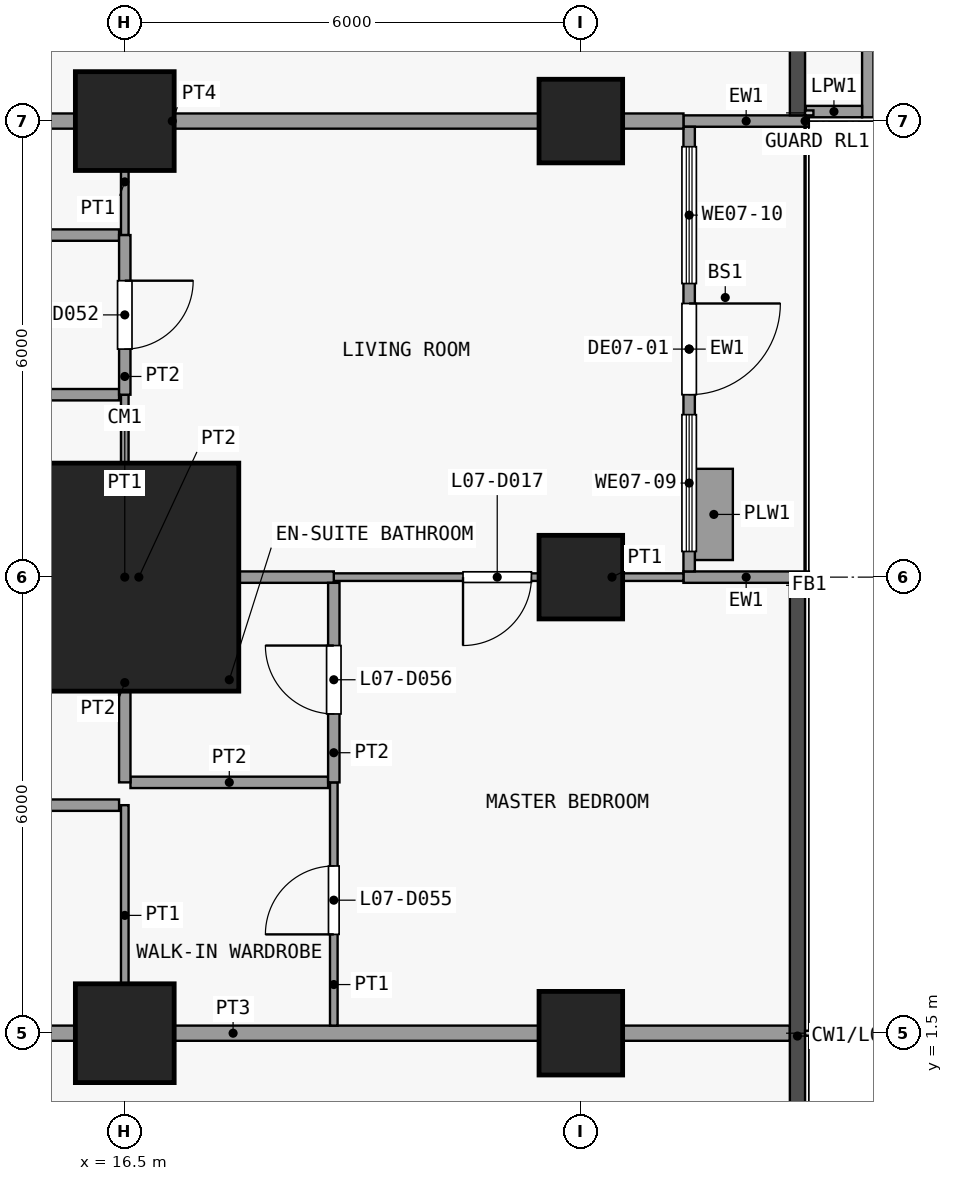
"""IFC4 building model, lengths in metres.
Left out: names, types, materials, properties, quantities, classifications, styles, units other than length and angle.
Written with IfcOpenShell. Run it as: python <this file> out.ifc"""

import sys

from ifc_helpers import new_model, si_unit, direction, frame, frame_2d, origin, origin_2d, place, context, subcontext, project, spatial, rectangle, extrude, element, fill, save


model = new_model("IFC4")
c1 = context("Model", 3, precision=1e-05, world=origin(), true_north=direction((0.0, 1.0)))
c2 = subcontext(c1, "Body", "Model", "MODEL_VIEW")
j1 = project(units=[si_unit("LENGTHUNIT", "METRE"), si_unit("PLANEANGLEUNIT", "RADIAN")], contexts=[c1])
p1 = place(None, origin())
s1 = spatial("IfcSite", under=j1, at=p1, CompositionType="ELEMENT")
p2 = place(p1, origin())
s2 = spatial("IfcBuilding", under=s1, at=p2, CompositionType="ELEMENT")
p3 = place(p2, frame((0.0, 0.0, 36.1)))
s3 = spatial("IfcBuildingStorey", under=s2, at=p3, CompositionType="ELEMENT", Elevation=36.1)
p4 = place(p3, frame((16.5, 1.5, 0.0), z_axis=(0.0, 0.0, 1.0), x_axis=(1.0, 0.0, 0.0)))
e1 = element("IfcColumn", 1, at=p4, inside=s3, PredefinedType="COLUMN", context=c2, shape_type="SweptSolid", body=[
    extrude(rectangle(XDim=1.3, YDim=1.3, at=origin_2d()), origin(), (0.0, 0.0, 1.0), 3.6),
])
p5 = place(p3, frame((16.5, 7.5, 0.0), z_axis=(0.0, 0.0, 1.0), x_axis=(1.0, 0.0, 0.0)))
e2 = element("IfcColumn", 2, at=p5, inside=s3, PredefinedType="COLUMN", context=c2, shape_type="SweptSolid", body=[
    extrude(rectangle(XDim=3.0, YDim=3.0, at=origin_2d()), origin(), (0.0, 0.0, 1.0), 3.6),
])
p6 = place(p3, frame((16.5, 13.5, 0.0), z_axis=(0.0, 0.0, 1.0), x_axis=(1.0, 0.0, 0.0)))
e3 = element("IfcColumn", 3, at=p6, inside=s3, PredefinedType="COLUMN", context=c2, shape_type="SweptSolid", body=[
    extrude(rectangle(XDim=1.3, YDim=1.3, at=origin_2d()), origin(), (0.0, 0.0, 1.0), 3.6),
])
for number, where, z_axis, x_axis in (
    (4, (22.5, 1.5, 0.0), (0.0, 0.0, 1.0), (1.0, 0.0, 0.0)),
    (5, (22.5, 7.5, 0.0), (0.0, 0.0, 1.0), (1.0, 0.0, 0.0)),
    (6, (22.5, 13.5, 0.0), (0.0, 0.0, 1.0), (1.0, 0.0, 0.0)),
):
    element("IfcColumn", number, at=place(p3, frame(where, z_axis=z_axis, x_axis=x_axis)), inside=s3, PredefinedType="COLUMN", context=c2, shape_type="SweptSolid", body=[
        extrude(rectangle(XDim=1.1, YDim=1.1, at=origin_2d()), origin(), (0.0, 0.0, 1.0), 3.6),
    ])
for number, where, z_axis, x_axis in (
    (7, (23.85, 7.5, 0.0), (0.0, 0.0, 1.0), (1.0, 0.0, 0.0)),
    (8, (23.85, 13.5, 0.0), (0.0, 0.0, 1.0), (1.0, 0.0, 0.0)),
):
    element("IfcWall", number, at=place(p3, frame(where, z_axis=z_axis, x_axis=x_axis)), inside=s3, PredefinedType="SOLIDWALL", context=c2, shape_type="SweptSolid", body=[
        extrude(rectangle(XDim=1.65, YDim=0.15, at=frame_2d((0.825, 0.0))), origin(), (0.0, 0.0, 1.0), 3.3),
    ])
p7 = place(p3, frame((23.925, 13.425, 0.0), z_axis=(0.0, 0.0, 1.0), x_axis=(0.0, -1.0, 0.0)))
e9 = element("IfcWall", 9, at=p7, inside=s3, PredefinedType="SOLIDWALL", context=c2, shape_type="SweptSolid", body=[
    extrude(rectangle(XDim=5.85, YDim=0.15, at=frame_2d((2.925, 0.0))), origin(), (0.0, 0.0, 1.0), 3.3),
])
p8 = place(p7, frame((2.325, 0.0, 0.0)))
e10 = element("IfcOpeningElement", 10, at=p8, cuts=e9, PredefinedType="OPENING", context=c2, shape_type="SweptSolid", body=[
    extrude(rectangle(XDim=1.2, YDim=2.4, at=frame_2d((0.6, 1.2))), frame((0.0, 0.085, 0.0), z_axis=(0.0, -1.0, 0.0), x_axis=(1.0, 0.0, 0.0)), (0.0, 0.0, 1.0), 0.17),
])
p9 = place(p7, frame((3.788, 0.0, 0.9)))
e11 = element("IfcOpeningElement", 11, at=p9, cuts=e9, PredefinedType="OPENING", context=c2, shape_type="SweptSolid", body=[
    extrude(rectangle(XDim=1.8, YDim=2.1, at=frame_2d((0.9, 1.05))), frame((0.0, 0.085, 0.0), z_axis=(0.0, -1.0, 0.0), x_axis=(1.0, 0.0, 0.0)), (0.0, 0.0, 1.0), 0.17),
])
p10 = place(p7, frame((0.262, 0.0, 0.9)))
e12 = element("IfcOpeningElement", 12, at=p10, cuts=e9, PredefinedType="OPENING", context=c2, shape_type="SweptSolid", body=[
    extrude(rectangle(XDim=1.8, YDim=2.1, at=frame_2d((0.9, 1.05))), frame((0.0, 0.085, 0.0), z_axis=(0.0, -1.0, 0.0), x_axis=(1.0, 0.0, 0.0)), (0.0, 0.0, 1.0), 0.17),
])
p11 = place(p3, frame((24.25, 7.725, 0.0), z_axis=(0.0, 0.0, 1.0), x_axis=(0.0, 1.0, 0.0)))
e13 = element("IfcWall", 13, at=p11, inside=s3, PredefinedType="USERDEFINED", context=c2, shape_type="SweptSolid", body=[
    extrude(rectangle(XDim=1.2, YDim=0.5, at=frame_2d((0.6, 0.0))), origin(), (0.0, 0.0, 1.0), 0.9),
])
p12 = place(p3, frame((26.275, 19.3, 0.0), z_axis=(0.0, 0.0, 1.0), x_axis=(0.0, -1.0, 0.0)))
e14 = element("IfcWall", 14, at=p12, inside=s3, PredefinedType="PARAPET", context=c2, shape_type="SweptSolid", body=[
    extrude(rectangle(XDim=5.75, YDim=0.15, at=frame_2d((2.875, 0.0))), origin(), (0.0, 0.0, 1.0), 1.15),
])
p13 = place(p3, frame((26.2, 13.625, 0.0), z_axis=(0.0, 0.0, 1.0), x_axis=(-1.0, 0.0, 0.0)))
e15 = element("IfcWall", 15, at=p13, inside=s3, PredefinedType="PARAPET", context=c2, shape_type="SweptSolid", body=[
    extrude(rectangle(XDim=0.74, YDim=0.15, at=frame_2d((0.37, 0.0))), origin(), (0.0, 0.0, 1.0), 1.15),
])
p14 = place(p3, frame((10.6, 1.5, 0.0), z_axis=(0.0, 0.0, 1.0), x_axis=(1.0, 0.0, 0.0)))
e16 = element("IfcWall", 16, at=p14, inside=s3, PredefinedType="PARTITIONING", context=c2, shape_type="SweptSolid", body=[
    extrude(rectangle(XDim=14.65, YDim=0.2, at=frame_2d((7.325, 0.0))), origin(), (0.0, 0.0, 1.0), 3.3),
])
p15 = place(p3, frame((10.6, 4.5, 0.0), z_axis=(0.0, 0.0, 1.0), x_axis=(1.0, 0.0, 0.0)))
e17 = element("IfcWall", 17, at=p15, inside=s3, PredefinedType="PARTITIONING", context=c2, shape_type="SweptSolid", body=[
    extrude(rectangle(XDim=5.825, YDim=0.15, at=frame_2d((2.913, 0.0))), origin(), (0.0, 0.0, 1.0), 3.3),
])
p16 = place(p15, frame((2.5, 0.0, 0.0)))
e18 = element("IfcOpeningElement", 18, at=p16, cuts=e17, PredefinedType="OPENING", context=c2, shape_type="SweptSolid", body=[
    extrude(rectangle(XDim=0.9, YDim=2.1, at=frame_2d((0.45, 1.05))), frame((0.0, 0.085, 0.0), z_axis=(0.0, -1.0, 0.0), x_axis=(1.0, 0.0, 0.0)), (0.0, 0.0, 1.0), 0.17),
])
p17 = place(p3, frame((16.575, 4.8, 0.0), z_axis=(0.0, 0.0, 1.0), x_axis=(1.0, 0.0, 0.0)))
e19 = element("IfcWall", 19, at=p17, inside=s3, PredefinedType="PARTITIONING", context=c2, shape_type="SweptSolid", body=[
    extrude(rectangle(XDim=2.6, YDim=0.15, at=frame_2d((1.3, 0.0))), origin(), (0.0, 0.0, 1.0), 3.3),
])
p18 = place(p3, frame((19.25, 7.5, 0.0), z_axis=(0.0, 0.0, 1.0), x_axis=(1.0, 0.0, 0.0)))
e20 = element("IfcWall", 20, at=p18, inside=s3, PredefinedType="PARTITIONING", context=c2, shape_type="SweptSolid", body=[
    extrude(rectangle(XDim=4.6, YDim=0.1, at=frame_2d((2.3, 0.0))), origin(), (0.0, 0.0, 1.0), 3.3),
])
p19 = place(p18, frame((1.7, 0.0, 0.0)))
e21 = element("IfcOpeningElement", 21, at=p19, cuts=e20, PredefinedType="OPENING", context=c2, shape_type="SweptSolid", body=[
    extrude(rectangle(XDim=0.9, YDim=2.1, at=frame_2d((0.45, 1.05))), frame((0.0, 0.06, 0.0), z_axis=(0.0, -1.0, 0.0), x_axis=(1.0, 0.0, 0.0)), (0.0, 0.0, 1.0), 0.12),
])
p20 = place(p3, frame((10.6, 7.5, 0.0), z_axis=(0.0, 0.0, 1.0), x_axis=(1.0, 0.0, 0.0)))
e22 = element("IfcWall", 22, at=p20, inside=s3, PredefinedType="PARTITIONING", context=c2, shape_type="SweptSolid", body=[
    extrude(rectangle(XDim=8.65, YDim=0.15, at=frame_2d((4.325, 0.0))), origin(), (0.0, 0.0, 1.0), 3.3),
])
p21 = place(p20, frame((2.5, 0.0, 0.0)))
e23 = element("IfcOpeningElement", 23, at=p21, cuts=e22, PredefinedType="OPENING", context=c2, shape_type="SweptSolid", body=[
    extrude(rectangle(XDim=0.9, YDim=2.1, at=frame_2d((0.45, 1.05))), frame((0.0, 0.085, 0.0), z_axis=(0.0, -1.0, 0.0), x_axis=(1.0, 0.0, 0.0)), (0.0, 0.0, 1.0), 0.17),
])
p22 = place(p3, frame((10.6, 9.9, 0.0), z_axis=(0.0, 0.0, 1.0), x_axis=(1.0, 0.0, 0.0)))
e24 = element("IfcWall", 24, at=p22, inside=s3, PredefinedType="PARTITIONING", context=c2, shape_type="SweptSolid", body=[
    extrude(rectangle(XDim=5.825, YDim=0.15, at=frame_2d((2.913, 0.0))), origin(), (0.0, 0.0, 1.0), 3.3),
])
p23 = place(p22, frame((2.5, 0.0, 0.0)))
e25 = element("IfcOpeningElement", 25, at=p23, cuts=e24, PredefinedType="OPENING", context=c2, shape_type="SweptSolid", body=[
    extrude(rectangle(XDim=0.9, YDim=2.1, at=frame_2d((0.45, 1.05))), frame((0.0, 0.085, 0.0), z_axis=(0.0, -1.0, 0.0), x_axis=(1.0, 0.0, 0.0)), (0.0, 0.0, 1.0), 0.17),
])
p24 = place(p3, frame((10.6, 12.0, 0.0), z_axis=(0.0, 0.0, 1.0), x_axis=(1.0, 0.0, 0.0)))
e26 = element("IfcWall", 26, at=p24, inside=s3, PredefinedType="PARTITIONING", context=c2, shape_type="SweptSolid", body=[
    extrude(rectangle(XDim=5.825, YDim=0.15, at=frame_2d((2.913, 0.0))), origin(), (0.0, 0.0, 1.0), 3.3),
])
p25 = place(p24, frame((2.5, 0.0, 0.0)))
e27 = element("IfcOpeningElement", 27, at=p25, cuts=e26, PredefinedType="OPENING", context=c2, shape_type="SweptSolid", body=[
    extrude(rectangle(XDim=0.9, YDim=2.1, at=frame_2d((0.45, 1.05))), frame((0.0, 0.085, 0.0), z_axis=(0.0, -1.0, 0.0), x_axis=(1.0, 0.0, 0.0)), (0.0, 0.0, 1.0), 0.17),
])
p26 = place(p3, frame((10.4, 13.5, 0.0), z_axis=(0.0, 0.0, 1.0), x_axis=(1.0, 0.0, 0.0)))
e28 = element("IfcWall", 28, at=p26, inside=s3, PredefinedType="PARTITIONING", context=c2, shape_type="SweptSolid", body=[
    extrude(rectangle(XDim=13.45, YDim=0.2, at=frame_2d((6.725, 0.0))), origin(), (0.0, 0.0, 1.0), 3.3),
])
p27 = place(p3, frame((16.5, 1.6, 0.0), z_axis=(0.0, 0.0, 1.0), x_axis=(0.0, 1.0, 0.0)))
e29 = element("IfcWall", 29, at=p27, inside=s3, PredefinedType="PARTITIONING", context=c2, shape_type="SweptSolid", body=[
    extrude(rectangle(XDim=2.9, YDim=0.1, at=frame_2d((1.45, 0.0))), origin(), (0.0, 0.0, 1.0), 3.3),
])
p28 = place(p3, frame((16.5, 7.575, 0.0), z_axis=(0.0, 0.0, 1.0), x_axis=(0.0, 1.0, 0.0)))
e30 = element("IfcWall", 30, at=p28, inside=s3, PredefinedType="PARTITIONING", context=c2, shape_type="SweptSolid", body=[
    extrude(rectangle(XDim=2.325, YDim=0.1, at=frame_2d((1.163, 0.0))), origin(), (0.0, 0.0, 1.0), 3.3),
])
p29 = place(p3, frame((16.5, 12.0, 0.0), z_axis=(0.0, 0.0, 1.0), x_axis=(0.0, 1.0, 0.0)))
e31 = element("IfcWall", 31, at=p29, inside=s3, PredefinedType="PARTITIONING", context=c2, shape_type="SweptSolid", body=[
    extrude(rectangle(XDim=1.4, YDim=0.1, at=frame_2d((0.7, 0.0))), origin(), (0.0, 0.0, 1.0), 3.3),
])
p30 = place(p3, frame((16.5, 4.8, 0.0), z_axis=(0.0, 0.0, 1.0), x_axis=(0.0, 1.0, 0.0)))
e32 = element("IfcWall", 32, at=p30, inside=s3, PredefinedType="PARTITIONING", context=c2, shape_type="SweptSolid", body=[
    extrude(rectangle(XDim=2.625, YDim=0.15, at=frame_2d((1.312, 0.0))), origin(), (0.0, 0.0, 1.0), 3.3),
])
p31 = place(p3, frame((16.5, 9.9, 0.0), z_axis=(0.0, 0.0, 1.0), x_axis=(0.0, 1.0, 0.0)))
e33 = element("IfcWall", 33, at=p31, inside=s3, PredefinedType="PARTITIONING", context=c2, shape_type="SweptSolid", body=[
    extrude(rectangle(XDim=2.1, YDim=0.15, at=frame_2d((1.05, 0.0))), origin(), (0.0, 0.0, 1.0), 3.3),
])
p32 = place(p31, frame((0.6, 0.0, 0.0)))
e34 = element("IfcOpeningElement", 34, at=p32, cuts=e33, PredefinedType="OPENING", context=c2, shape_type="SweptSolid", body=[
    extrude(rectangle(XDim=0.9, YDim=2.1, at=frame_2d((0.45, 1.05))), frame((0.0, 0.085, 0.0), z_axis=(0.0, -1.0, 0.0), x_axis=(1.0, 0.0, 0.0)), (0.0, 0.0, 1.0), 0.17),
])
p33 = place(p3, frame((19.25, 1.6, 0.0), z_axis=(0.0, 0.0, 1.0), x_axis=(0.0, 1.0, 0.0)))
e35 = element("IfcWall", 35, at=p33, inside=s3, PredefinedType="PARTITIONING", context=c2, shape_type="SweptSolid", body=[
    extrude(rectangle(XDim=3.2, YDim=0.1, at=frame_2d((1.6, 0.0))), origin(), (0.0, 0.0, 1.0), 3.3),
])
p34 = place(p33, frame((1.2, 0.0, 0.0)))
e36 = element("IfcOpeningElement", 36, at=p34, cuts=e35, PredefinedType="OPENING", context=c2, shape_type="SweptSolid", body=[
    extrude(rectangle(XDim=0.9, YDim=2.1, at=frame_2d((0.45, 1.05))), frame((0.0, 0.06, 0.0), z_axis=(0.0, -1.0, 0.0), x_axis=(1.0, 0.0, 0.0)), (0.0, 0.0, 1.0), 0.12),
])
p35 = place(p3, frame((19.25, 4.8, 0.0), z_axis=(0.0, 0.0, 1.0), x_axis=(0.0, 1.0, 0.0)))
e37 = element("IfcWall", 37, at=p35, inside=s3, PredefinedType="PARTITIONING", context=c2, shape_type="SweptSolid", body=[
    extrude(rectangle(XDim=2.625, YDim=0.15, at=frame_2d((1.312, 0.0))), origin(), (0.0, 0.0, 1.0), 3.3),
])
p36 = place(p35, frame((0.9, 0.0, 0.0)))
e38 = element("IfcOpeningElement", 38, at=p36, cuts=e37, PredefinedType="OPENING", context=c2, shape_type="SweptSolid", body=[
    extrude(rectangle(XDim=0.9, YDim=2.1, at=frame_2d((0.45, 1.05))), frame((0.0, 0.085, 0.0), z_axis=(0.0, -1.0, 0.0), x_axis=(1.0, 0.0, 0.0)), (0.0, 0.0, 1.0), 0.17),
])
p37 = place(p8, origin())
e39 = element("IfcDoor", 39, at=p37, inside=s3, OperationType="SINGLE_SWING_LEFT", PredefinedType="DOOR", context=c2, shape_type="SweptSolid", body=[
    extrude(rectangle(XDim=1.2, YDim=2.4, at=frame_2d((0.6, 1.2))), frame((0.0, 0.025, 0.0), z_axis=(0.0, -1.0, 0.0), x_axis=(1.0, 0.0, 0.0)), (0.0, 0.0, 1.0), 0.05),
])
fill(e10, e39)
p38 = place(p9, origin())
e40 = element("IfcWindow", 40, at=p38, inside=s3, PartitioningType="SINGLE_PANEL", PredefinedType="WINDOW", context=c2, shape_type="SweptSolid", body=[
    extrude(rectangle(XDim=1.8, YDim=2.1, at=frame_2d((0.9, 1.05))), frame((0.0, 0.03, 0.0), z_axis=(0.0, -1.0, 0.0), x_axis=(1.0, 0.0, 0.0)), (0.0, 0.0, 1.0), 0.06),
])
fill(e11, e40)
p39 = place(p10, origin())
e41 = element("IfcWindow", 41, at=p39, inside=s3, PartitioningType="SINGLE_PANEL", PredefinedType="WINDOW", context=c2, shape_type="SweptSolid", body=[
    extrude(rectangle(XDim=1.8, YDim=2.1, at=frame_2d((0.9, 1.05))), frame((0.0, 0.03, 0.0), z_axis=(0.0, -1.0, 0.0), x_axis=(1.0, 0.0, 0.0)), (0.0, 0.0, 1.0), 0.06),
])
fill(e12, e41)
p40 = place(p19, origin())
e42 = element("IfcDoor", 42, at=p40, inside=s3, OperationType="SINGLE_SWING_LEFT", PredefinedType="DOOR", context=c2, shape_type="SweptSolid", body=[
    extrude(rectangle(XDim=0.9, YDim=2.1, at=frame_2d((0.45, 1.05))), frame((0.0, 0.025, 0.0), z_axis=(0.0, -1.0, 0.0), x_axis=(1.0, 0.0, 0.0)), (0.0, 0.0, 1.0), 0.05),
])
fill(e21, e42)
p41 = place(p32, origin())
e43 = element("IfcDoor", 43, at=p41, inside=s3, OperationType="SINGLE_SWING_RIGHT", PredefinedType="DOOR", context=c2, shape_type="SweptSolid", body=[
    extrude(rectangle(XDim=0.9, YDim=2.1, at=frame_2d((0.45, 1.05))), frame((0.0, 0.025, 0.0), z_axis=(0.0, -1.0, 0.0), x_axis=(1.0, 0.0, 0.0)), (0.0, 0.0, 1.0), 0.05),
])
fill(e34, e43)
p42 = place(p34, origin())
e44 = element("IfcDoor", 44, at=p42, inside=s3, OperationType="SINGLE_SWING_RIGHT", PredefinedType="DOOR", context=c2, shape_type="SweptSolid", body=[
    extrude(rectangle(XDim=0.9, YDim=2.1, at=frame_2d((0.45, 1.05))), frame((0.0, 0.025, 0.0), z_axis=(0.0, -1.0, 0.0), x_axis=(1.0, 0.0, 0.0)), (0.0, 0.0, 1.0), 0.05),
])
fill(e36, e44)
p43 = place(p36, origin())
e45 = element("IfcDoor", 45, at=p43, inside=s3, OperationType="SINGLE_SWING_LEFT", PredefinedType="DOOR", context=c2, shape_type="SweptSolid", body=[
    extrude(rectangle(XDim=0.9, YDim=2.1, at=frame_2d((0.45, 1.05))), frame((0.0, 0.025, 0.0), z_axis=(0.0, -1.0, 0.0), x_axis=(1.0, 0.0, 0.0)), (0.0, 0.0, 1.0), 0.05),
])
fill(e38, e45)
save(model, sys.argv[1])
